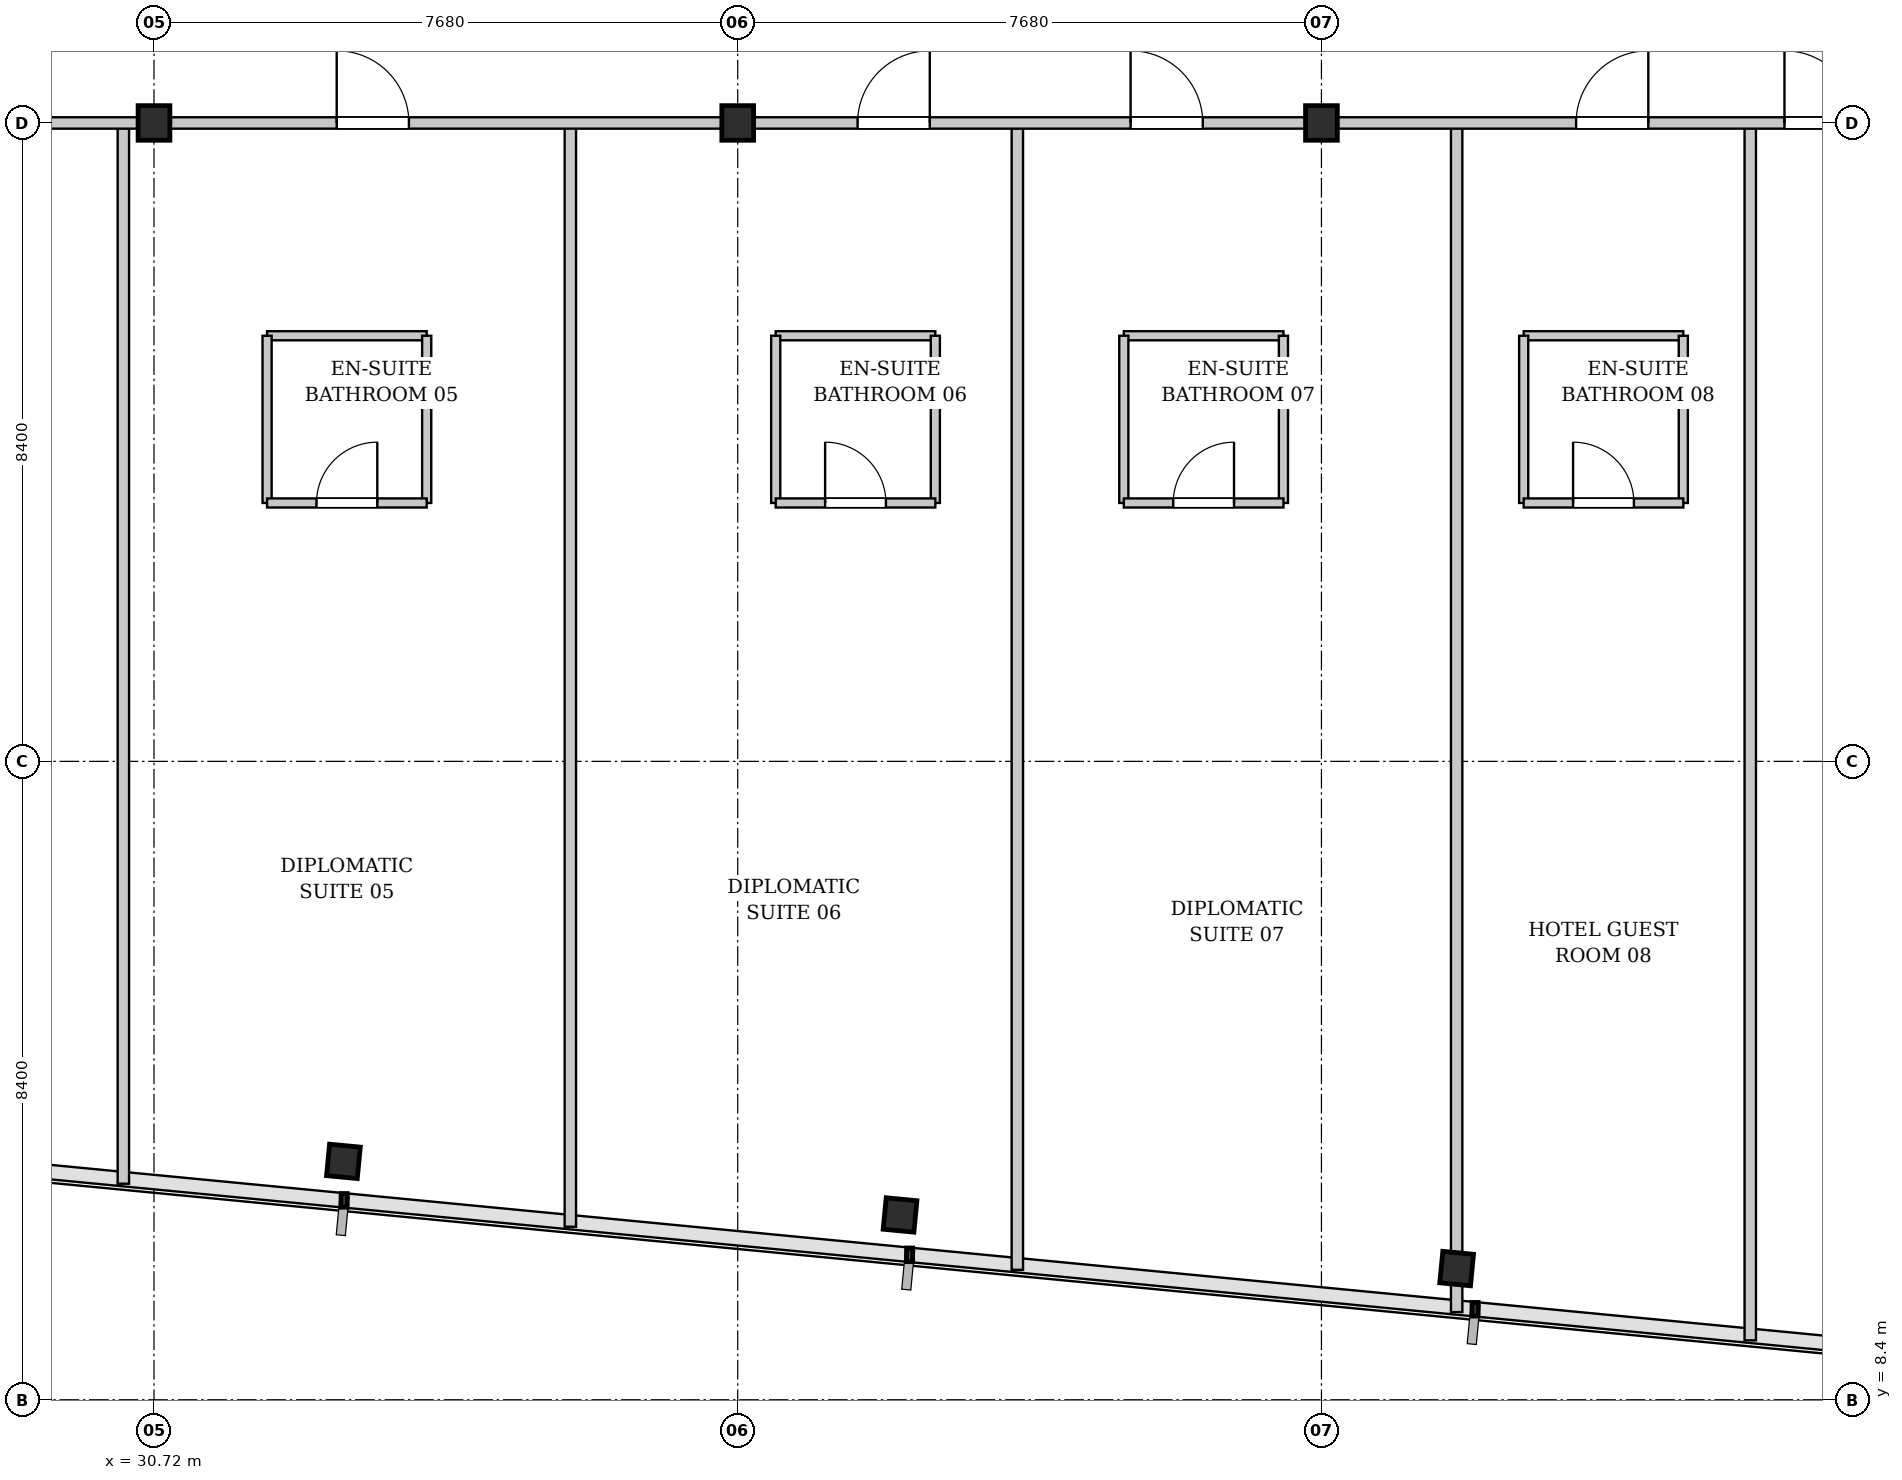
"""IFC4 building model, lengths in metres.
Left out: names, types, materials, properties, quantities, classifications, styles, units other than length and angle.
Written with IfcOpenShell. Run it as: python <this file> out.ifc"""

import sys

from ifc_helpers import new_model, si_unit, direction, frame, frame_2d, origin, origin_2d, place, context, subcontext, project, spatial, rectangle, i_section, extrude, element, fill, save


model = new_model("IFC4")
c1 = context("Model", 3, precision=1e-05, world=origin(), true_north=direction((0.0, 1.0)))
c2 = subcontext(c1, "Body", "Model", "MODEL_VIEW")
j1 = project(units=[si_unit("LENGTHUNIT", "METRE"), si_unit("PLANEANGLEUNIT", "RADIAN")], contexts=[c1])
p1 = place(None, origin())
s1 = spatial("IfcSite", under=j1, at=p1, CompositionType="ELEMENT")
p2 = place(p1, origin())
s2 = spatial("IfcBuilding", under=s1, at=p2, CompositionType="ELEMENT")
p3 = place(p2, frame((0.0, 0.0, 155.6)))
s3 = spatial("IfcBuildingStorey", under=s2, at=p3, CompositionType="ELEMENT", Elevation=155.6)
for number, where, z_axis, x_axis in (
    (1, (30.72, 25.2, 0.0), (0.0, 0.0, 1.0), (1.0, 0.0, 0.0)),
    (2, (38.4, 25.2, 0.0), (0.0, 0.0, 1.0), (1.0, 0.0, 0.0)),
    (3, (46.08, 25.2, 0.0), (0.0, 0.0, 1.0), (1.0, 0.0, 0.0)),
):
    element("IfcColumn", number, at=place(p3, frame(where, z_axis=z_axis, x_axis=x_axis)), inside=s3, PredefinedType="COLUMN", context=c2, shape_type="SweptSolid", body=[
        extrude(i_section(OverallWidth=0.418, OverallDepth=0.455, WebThickness=0.042, FlangeThickness=0.068, FilletRadius=0.015, at=origin_2d()), origin(), (0.0, 0.0, 1.0), 3.3),
    ])
for number, where, z_axis, x_axis in (
    (4, (33.212, 11.537, 0.0), (0.0, 0.0, 1.0), (0.995, -0.096, 0.0)),
    (5, (40.536, 10.832, 0.0), (0.0, 0.0, 1.0), (0.995, -0.096, 0.0)),
    (6, (47.859, 10.126, 0.0), (0.0, 0.0, 1.0), (0.995, -0.096, 0.0)),
):
    element("IfcColumn", number, at=place(p3, frame(where, z_axis=z_axis, x_axis=x_axis)), inside=s3, PredefinedType="COLUMN", context=c2, shape_type="SweptSolid", body=[
        extrude(i_section(OverallWidth=0.406, OverallDepth=0.416, WebThickness=0.03, FlangeThickness=0.048, FilletRadius=0.015, at=origin_2d()), origin(), (0.0, 0.0, 1.0), 3.3),
    ])
p4 = place(p3, frame((32.208, 22.4, 0.0), z_axis=(0.0, 0.0, 1.0), x_axis=(1.0, 0.0, 0.0)))
e7 = element("IfcWall", 7, at=p4, inside=s3, PredefinedType="PARTITIONING", context=c2, shape_type="SweptSolid", body=[
    extrude(rectangle(XDim=2.1, YDim=0.12, at=frame_2d((1.05, 0.0))), origin(), (0.0, 0.0, 1.0), 3.08),
])
for number, where, z_axis, x_axis in (
    (8, (32.208, 20.2, 0.0), (0.0, 0.0, 1.0), (0.0, 1.0, 0.0)),
    (9, (34.308, 20.2, 0.0), (0.0, 0.0, 1.0), (0.0, 1.0, 0.0)),
):
    element("IfcWall", number, at=place(p3, frame(where, z_axis=z_axis, x_axis=x_axis)), inside=s3, PredefinedType="PARTITIONING", context=c2, shape_type="SweptSolid", body=[
        extrude(rectangle(XDim=2.2, YDim=0.12, at=frame_2d((1.1, 0.0))), origin(), (0.0, 0.0, 1.0), 3.08),
    ])
p5 = place(p3, frame((32.208, 20.2, 0.0), z_axis=(0.0, 0.0, 1.0), x_axis=(1.0, 0.0, 0.0)))
e10 = element("IfcWall", 10, at=p5, inside=s3, PredefinedType="PARTITIONING", context=c2, shape_type="SweptSolid", body=[
    extrude(rectangle(XDim=2.1, YDim=0.12, at=frame_2d((1.05, 0.0))), origin(), (0.0, 0.0, 1.0), 3.08),
])
p6 = place(p5, frame((0.65, 0.0, 0.0)))
e11 = element("IfcOpeningElement", 11, at=p6, cuts=e10, PredefinedType="OPENING", context=c2, shape_type="SweptSolid", body=[
    extrude(rectangle(XDim=0.8, YDim=2.1, at=frame_2d((0.4, 1.05))), frame((0.0, 0.07, 0.0), z_axis=(0.0, -1.0, 0.0), x_axis=(1.0, 0.0, 0.0)), (0.0, 0.0, 1.0), 0.14),
])
p7 = place(p3, frame((30.317, 11.243, 0.0), z_axis=(0.0, 0.0, 1.0), x_axis=(0.0, 1.0, 0.0)))
e12 = element("IfcWall", 12, at=p7, inside=s3, PredefinedType="PARTITIONING", context=c2, shape_type="SweptSolid", body=[
    extrude(rectangle(XDim=13.977, YDim=0.15, at=frame_2d((6.989, 0.0))), origin(), (0.0, 0.0, 1.0), 3.08),
])
p8 = place(p3, frame((38.9, 22.4, 0.0), z_axis=(0.0, 0.0, 1.0), x_axis=(1.0, 0.0, 0.0)))
e13 = element("IfcWall", 13, at=p8, inside=s3, PredefinedType="PARTITIONING", context=c2, shape_type="SweptSolid", body=[
    extrude(rectangle(XDim=2.1, YDim=0.12, at=frame_2d((1.05, 0.0))), origin(), (0.0, 0.0, 1.0), 3.08),
])
p9 = place(p3, frame((38.9, 20.2, 0.0), z_axis=(0.0, 0.0, 1.0), x_axis=(0.0, 1.0, 0.0)))
e14 = element("IfcWall", 14, at=p9, inside=s3, PredefinedType="PARTITIONING", context=c2, shape_type="SweptSolid", body=[
    extrude(rectangle(XDim=2.2, YDim=0.12, at=frame_2d((1.1, 0.0))), origin(), (0.0, 0.0, 1.0), 2.475),
])
p10 = place(p3, frame((41.0, 20.2, 0.0), z_axis=(0.0, 0.0, 1.0), x_axis=(0.0, 1.0, 0.0)))
e15 = element("IfcWall", 15, at=p10, inside=s3, PredefinedType="PARTITIONING", context=c2, shape_type="SweptSolid", body=[
    extrude(rectangle(XDim=2.2, YDim=0.12, at=frame_2d((1.1, 0.0))), origin(), (0.0, 0.0, 1.0), 3.08),
])
p11 = place(p3, frame((38.9, 20.2, 0.0), z_axis=(0.0, 0.0, 1.0), x_axis=(1.0, 0.0, 0.0)))
e16 = element("IfcWall", 16, at=p11, inside=s3, PredefinedType="PARTITIONING", context=c2, shape_type="SweptSolid", body=[
    extrude(rectangle(XDim=2.1, YDim=0.12, at=frame_2d((1.05, 0.0))), origin(), (0.0, 0.0, 1.0), 3.08),
])
p12 = place(p11, frame((0.65, 0.0, 0.0)))
e17 = element("IfcOpeningElement", 17, at=p12, cuts=e16, PredefinedType="OPENING", context=c2, shape_type="SweptSolid", body=[
    extrude(rectangle(XDim=0.8, YDim=2.1, at=frame_2d((0.4, 1.05))), frame((0.0, 0.07, 0.0), z_axis=(0.0, -1.0, 0.0), x_axis=(1.0, 0.0, 0.0)), (0.0, 0.0, 1.0), 0.14),
])
p13 = place(p3, frame((36.198, 10.677, 0.0), z_axis=(0.0, 0.0, 1.0), x_axis=(0.0, 1.0, 0.0)))
e18 = element("IfcWall", 18, at=p13, inside=s3, PredefinedType="PARTITIONING", context=c2, shape_type="SweptSolid", body=[
    extrude(rectangle(XDim=14.543, YDim=0.15, at=frame_2d((7.272, 0.0))), origin(), (0.0, 0.0, 1.0), 3.08),
])
p14 = place(p3, frame((43.48, 22.4, 0.0), z_axis=(0.0, 0.0, 1.0), x_axis=(1.0, 0.0, 0.0)))
e19 = element("IfcWall", 19, at=p14, inside=s3, PredefinedType="PARTITIONING", context=c2, shape_type="SweptSolid", body=[
    extrude(rectangle(XDim=2.1, YDim=0.12, at=frame_2d((1.05, 0.0))), origin(), (0.0, 0.0, 1.0), 3.08),
])
for number, where, z_axis, x_axis in (
    (20, (43.48, 20.2, 0.0), (0.0, 0.0, 1.0), (0.0, 1.0, 0.0)),
    (21, (45.58, 20.2, 0.0), (0.0, 0.0, 1.0), (0.0, 1.0, 0.0)),
):
    element("IfcWall", number, at=place(p3, frame(where, z_axis=z_axis, x_axis=x_axis)), inside=s3, PredefinedType="PARTITIONING", context=c2, shape_type="SweptSolid", body=[
        extrude(rectangle(XDim=2.2, YDim=0.12, at=frame_2d((1.1, 0.0))), origin(), (0.0, 0.0, 1.0), 3.08),
    ])
p15 = place(p3, frame((43.48, 20.2, 0.0), z_axis=(0.0, 0.0, 1.0), x_axis=(1.0, 0.0, 0.0)))
e22 = element("IfcWall", 22, at=p15, inside=s3, PredefinedType="PARTITIONING", context=c2, shape_type="SweptSolid", body=[
    extrude(rectangle(XDim=2.1, YDim=0.12, at=frame_2d((1.05, 0.0))), origin(), (0.0, 0.0, 1.0), 3.08),
])
p16 = place(p15, frame((0.65, 0.0, 0.0)))
e23 = element("IfcOpeningElement", 23, at=p16, cuts=e22, PredefinedType="OPENING", context=c2, shape_type="SweptSolid", body=[
    extrude(rectangle(XDim=0.8, YDim=2.1, at=frame_2d((0.4, 1.05))), frame((0.0, 0.07, 0.0), z_axis=(0.0, -1.0, 0.0), x_axis=(1.0, 0.0, 0.0)), (0.0, 0.0, 1.0), 0.14),
])
p17 = place(p3, frame((42.079, 10.11, 0.0), z_axis=(0.0, 0.0, 1.0), x_axis=(0.0, 1.0, 0.0)))
e24 = element("IfcWall", 24, at=p17, inside=s3, PredefinedType="PARTITIONING", context=c2, shape_type="SweptSolid", body=[
    extrude(rectangle(XDim=15.11, YDim=0.15, at=frame_2d((7.555, 0.0))), origin(), (0.0, 0.0, 1.0), 3.08),
])
p18 = place(p3, frame((48.741, 22.4, 0.0), z_axis=(0.0, 0.0, 1.0), x_axis=(1.0, 0.0, 0.0)))
e25 = element("IfcWall", 25, at=p18, inside=s3, PredefinedType="PARTITIONING", context=c2, shape_type="SweptSolid", body=[
    extrude(rectangle(XDim=2.1, YDim=0.12, at=frame_2d((1.05, 0.0))), origin(), (0.0, 0.0, 1.0), 3.08),
])
for number, where, z_axis, x_axis in (
    (26, (48.741, 20.2, 0.0), (0.0, 0.0, 1.0), (0.0, 1.0, 0.0)),
    (27, (50.841, 20.2, 0.0), (0.0, 0.0, 1.0), (0.0, 1.0, 0.0)),
):
    element("IfcWall", number, at=place(p3, frame(where, z_axis=z_axis, x_axis=x_axis)), inside=s3, PredefinedType="PARTITIONING", context=c2, shape_type="SweptSolid", body=[
        extrude(rectangle(XDim=2.2, YDim=0.12, at=frame_2d((1.1, 0.0))), origin(), (0.0, 0.0, 1.0), 3.08),
    ])
p19 = place(p3, frame((48.741, 20.2, 0.0), z_axis=(0.0, 0.0, 1.0), x_axis=(1.0, 0.0, 0.0)))
e28 = element("IfcWall", 28, at=p19, inside=s3, PredefinedType="PARTITIONING", context=c2, shape_type="SweptSolid", body=[
    extrude(rectangle(XDim=2.1, YDim=0.12, at=frame_2d((1.05, 0.0))), origin(), (0.0, 0.0, 1.0), 3.08),
])
p20 = place(p19, frame((0.65, 0.0, 0.0)))
e29 = element("IfcOpeningElement", 29, at=p20, cuts=e28, PredefinedType="OPENING", context=c2, shape_type="SweptSolid", body=[
    extrude(rectangle(XDim=0.8, YDim=2.1, at=frame_2d((0.4, 1.05))), frame((0.0, 0.07, 0.0), z_axis=(0.0, -1.0, 0.0), x_axis=(1.0, 0.0, 0.0)), (0.0, 0.0, 1.0), 0.14),
])
p21 = place(p3, frame((47.859, 9.554, 0.0), z_axis=(0.0, 0.0, 1.0), x_axis=(0.0, 1.0, 0.0)))
e30 = element("IfcWall", 30, at=p21, inside=s3, PredefinedType="PARTITIONING", context=c2, shape_type="SweptSolid", body=[
    extrude(rectangle(XDim=15.666, YDim=0.15, at=frame_2d((7.833, 0.0))), origin(), (0.0, 0.0, 1.0), 2.475),
])
p22 = place(p3, frame((51.722, 9.182, 0.0), z_axis=(0.0, 0.0, 1.0), x_axis=(0.0, 1.0, 0.0)))
e31 = element("IfcWall", 31, at=p22, inside=s3, PredefinedType="PARTITIONING", context=c2, shape_type="SweptSolid", body=[
    extrude(rectangle(XDim=16.038, YDim=0.15, at=frame_2d((8.019, 0.0))), origin(), (0.0, 0.0, 1.0), 3.08),
])
p23 = place(p3, frame((2.08, 25.2, 0.0), z_axis=(0.0, 0.0, 1.0), x_axis=(1.0, 0.0, 0.0)))
e32 = element("IfcWall", 32, at=p23, inside=s3, PredefinedType="PARTITIONING", context=c2, shape_type="SweptSolid", body=[
    extrude(rectangle(XDim=57.505, YDim=0.15, at=frame_2d((28.752, 0.0))), origin(), (0.0, 0.0, 1.0), 2.475),
])
p24 = place(p23, frame((8.662, 0.0, 0.0)))
e33 = element("IfcOpeningElement", 33, at=p24, cuts=e32, PredefinedType="OPENING", context=c2, shape_type="SweptSolid", body=[
    extrude(rectangle(XDim=0.95, YDim=2.15, at=frame_2d((0.475, 1.075))), frame((0.0, 0.085, 0.0), z_axis=(0.0, -1.0, 0.0), x_axis=(1.0, 0.0, 0.0)), (0.0, 0.0, 1.0), 0.17),
])
p25 = place(p23, frame((13.504, 0.0, 0.0)))
e34 = element("IfcOpeningElement", 34, at=p25, cuts=e32, PredefinedType="OPENING", context=c2, shape_type="SweptSolid", body=[
    extrude(rectangle(XDim=0.95, YDim=2.15, at=frame_2d((0.475, 1.075))), frame((0.0, 0.085, 0.0), z_axis=(0.0, -1.0, 0.0), x_axis=(1.0, 0.0, 0.0)), (0.0, 0.0, 1.0), 0.17),
])
p26 = place(p23, frame((18.512, 0.0, 0.0)))
e35 = element("IfcOpeningElement", 35, at=p26, cuts=e32, PredefinedType="OPENING", context=c2, shape_type="SweptSolid", body=[
    extrude(rectangle(XDim=0.95, YDim=2.15, at=frame_2d((0.475, 1.075))), frame((0.0, 0.085, 0.0), z_axis=(0.0, -1.0, 0.0), x_axis=(1.0, 0.0, 0.0)), (0.0, 0.0, 1.0), 0.17),
])
p27 = place(p23, frame((24.937, 0.0, 0.0)))
e36 = element("IfcOpeningElement", 36, at=p27, cuts=e32, PredefinedType="OPENING", context=c2, shape_type="SweptSolid", body=[
    extrude(rectangle(XDim=0.95, YDim=2.15, at=frame_2d((0.475, 1.075))), frame((0.0, 0.085, 0.0), z_axis=(0.0, -1.0, 0.0), x_axis=(1.0, 0.0, 0.0)), (0.0, 0.0, 1.0), 0.17),
])
p28 = place(p23, frame((31.044, 0.0, 0.0)))
e37 = element("IfcOpeningElement", 37, at=p28, cuts=e32, PredefinedType="OPENING", context=c2, shape_type="SweptSolid", body=[
    extrude(rectangle(XDim=0.95, YDim=2.15, at=frame_2d((0.475, 1.075))), frame((0.0, 0.085, 0.0), z_axis=(0.0, -1.0, 0.0), x_axis=(1.0, 0.0, 0.0)), (0.0, 0.0, 1.0), 0.17),
])
p29 = place(p23, frame((37.897, 0.0, 0.0)))
e38 = element("IfcOpeningElement", 38, at=p29, cuts=e32, PredefinedType="OPENING", context=c2, shape_type="SweptSolid", body=[
    extrude(rectangle(XDim=0.95, YDim=2.15, at=frame_2d((0.475, 1.075))), frame((0.0, 0.085, 0.0), z_axis=(0.0, -1.0, 0.0), x_axis=(1.0, 0.0, 0.0)), (0.0, 0.0, 1.0), 0.17),
])
p30 = place(p23, frame((41.489, 0.0, 0.0)))
e39 = element("IfcOpeningElement", 39, at=p30, cuts=e32, PredefinedType="OPENING", context=c2, shape_type="SweptSolid", body=[
    extrude(rectangle(XDim=0.95, YDim=2.15, at=frame_2d((0.475, 1.075))), frame((0.0, 0.085, 0.0), z_axis=(0.0, -1.0, 0.0), x_axis=(1.0, 0.0, 0.0)), (0.0, 0.0, 1.0), 0.17),
])
p31 = place(p23, frame((47.351, 0.0, 0.0)))
e40 = element("IfcOpeningElement", 40, at=p31, cuts=e32, PredefinedType="OPENING", context=c2, shape_type="SweptSolid", body=[
    extrude(rectangle(XDim=0.95, YDim=2.15, at=frame_2d((0.475, 1.075))), frame((0.0, 0.085, 0.0), z_axis=(0.0, -1.0, 0.0), x_axis=(1.0, 0.0, 0.0)), (0.0, 0.0, 1.0), 0.17),
])
p32 = place(p23, frame((50.092, 0.0, 0.0)))
e41 = element("IfcOpeningElement", 41, at=p32, cuts=e32, PredefinedType="OPENING", context=c2, shape_type="SweptSolid", body=[
    extrude(rectangle(XDim=0.95, YDim=2.15, at=frame_2d((0.475, 1.075))), frame((0.0, 0.085, 0.0), z_axis=(0.0, -1.0, 0.0), x_axis=(1.0, 0.0, 0.0)), (0.0, 0.0, 1.0), 0.17),
])
p33 = place(p6, origin())
e42 = element("IfcDoor", 42, at=p33, inside=s3, OperationType="SINGLE_SWING_RIGHT", PredefinedType="DOOR", context=c2, shape_type="SweptSolid", body=[
    extrude(rectangle(XDim=0.8, YDim=2.1, at=frame_2d((0.4, 1.05))), frame((0.0, 0.025, 0.0), z_axis=(0.0, -1.0, 0.0), x_axis=(1.0, 0.0, 0.0)), (0.0, 0.0, 1.0), 0.05),
])
fill(e11, e42)
p34 = place(p12, origin())
e43 = element("IfcDoor", 43, at=p34, inside=s3, OperationType="SINGLE_SWING_LEFT", PredefinedType="DOOR", context=c2, shape_type="SweptSolid", body=[
    extrude(rectangle(XDim=0.8, YDim=2.1, at=frame_2d((0.4, 1.05))), frame((0.0, 0.025, 0.0), z_axis=(0.0, -1.0, 0.0), x_axis=(1.0, 0.0, 0.0)), (0.0, 0.0, 1.0), 0.05),
])
fill(e17, e43)
p35 = place(p16, origin())
e44 = element("IfcDoor", 44, at=p35, inside=s3, OperationType="SINGLE_SWING_RIGHT", PredefinedType="DOOR", context=c2, shape_type="SweptSolid", body=[
    extrude(rectangle(XDim=0.8, YDim=2.1, at=frame_2d((0.4, 1.05))), frame((0.0, 0.025, 0.0), z_axis=(0.0, -1.0, 0.0), x_axis=(1.0, 0.0, 0.0)), (0.0, 0.0, 1.0), 0.05),
])
fill(e23, e44)
p36 = place(p20, origin())
e45 = element("IfcDoor", 45, at=p36, inside=s3, OperationType="SINGLE_SWING_LEFT", PredefinedType="DOOR", context=c2, shape_type="SweptSolid", body=[
    extrude(rectangle(XDim=0.8, YDim=2.1, at=frame_2d((0.4, 1.05))), frame((0.0, 0.025, 0.0), z_axis=(0.0, -1.0, 0.0), x_axis=(1.0, 0.0, 0.0)), (0.0, 0.0, 1.0), 0.05),
])
fill(e29, e45)
p37 = place(p28, origin())
e46 = element("IfcDoor", 46, at=p37, inside=s3, OperationType="SINGLE_SWING_LEFT", PredefinedType="DOOR", context=c2, shape_type="SweptSolid", body=[
    extrude(rectangle(XDim=0.95, YDim=2.15, at=frame_2d((0.475, 1.075))), frame((0.0, 0.025, 0.0), z_axis=(0.0, -1.0, 0.0), x_axis=(1.0, 0.0, 0.0)), (0.0, 0.0, 1.0), 0.05),
])
fill(e37, e46)
p38 = place(p29, origin())
e47 = element("IfcDoor", 47, at=p38, inside=s3, OperationType="SINGLE_SWING_RIGHT", PredefinedType="DOOR", context=c2, shape_type="SweptSolid", body=[
    extrude(rectangle(XDim=0.95, YDim=2.15, at=frame_2d((0.475, 1.075))), frame((0.0, 0.025, 0.0), z_axis=(0.0, -1.0, 0.0), x_axis=(1.0, 0.0, 0.0)), (0.0, 0.0, 1.0), 0.05),
])
fill(e38, e47)
p39 = place(p30, origin())
e48 = element("IfcDoor", 48, at=p39, inside=s3, OperationType="SINGLE_SWING_LEFT", PredefinedType="DOOR", context=c2, shape_type="SweptSolid", body=[
    extrude(rectangle(XDim=0.95, YDim=2.15, at=frame_2d((0.475, 1.075))), frame((0.0, 0.025, 0.0), z_axis=(0.0, -1.0, 0.0), x_axis=(1.0, 0.0, 0.0)), (0.0, 0.0, 1.0), 0.05),
])
fill(e39, e48)
p40 = place(p31, origin())
e49 = element("IfcDoor", 49, at=p40, inside=s3, OperationType="SINGLE_SWING_RIGHT", PredefinedType="DOOR", context=c2, shape_type="SweptSolid", body=[
    extrude(rectangle(XDim=0.95, YDim=2.15, at=frame_2d((0.475, 1.075))), frame((0.0, 0.025, 0.0), z_axis=(0.0, -1.0, 0.0), x_axis=(1.0, 0.0, 0.0)), (0.0, 0.0, 1.0), 0.05),
])
fill(e40, e49)
p41 = place(p32, origin())
e50 = element("IfcDoor", 50, at=p41, inside=s3, OperationType="SINGLE_SWING_LEFT", PredefinedType="DOOR", context=c2, shape_type="SweptSolid", body=[
    extrude(rectangle(XDim=0.95, YDim=2.15, at=frame_2d((0.475, 1.075))), frame((0.0, 0.025, 0.0), z_axis=(0.0, -1.0, 0.0), x_axis=(1.0, 0.0, 0.0)), (0.0, 0.0, 1.0), 0.05),
])
fill(e41, e50)
save(model, sys.argv[1])
